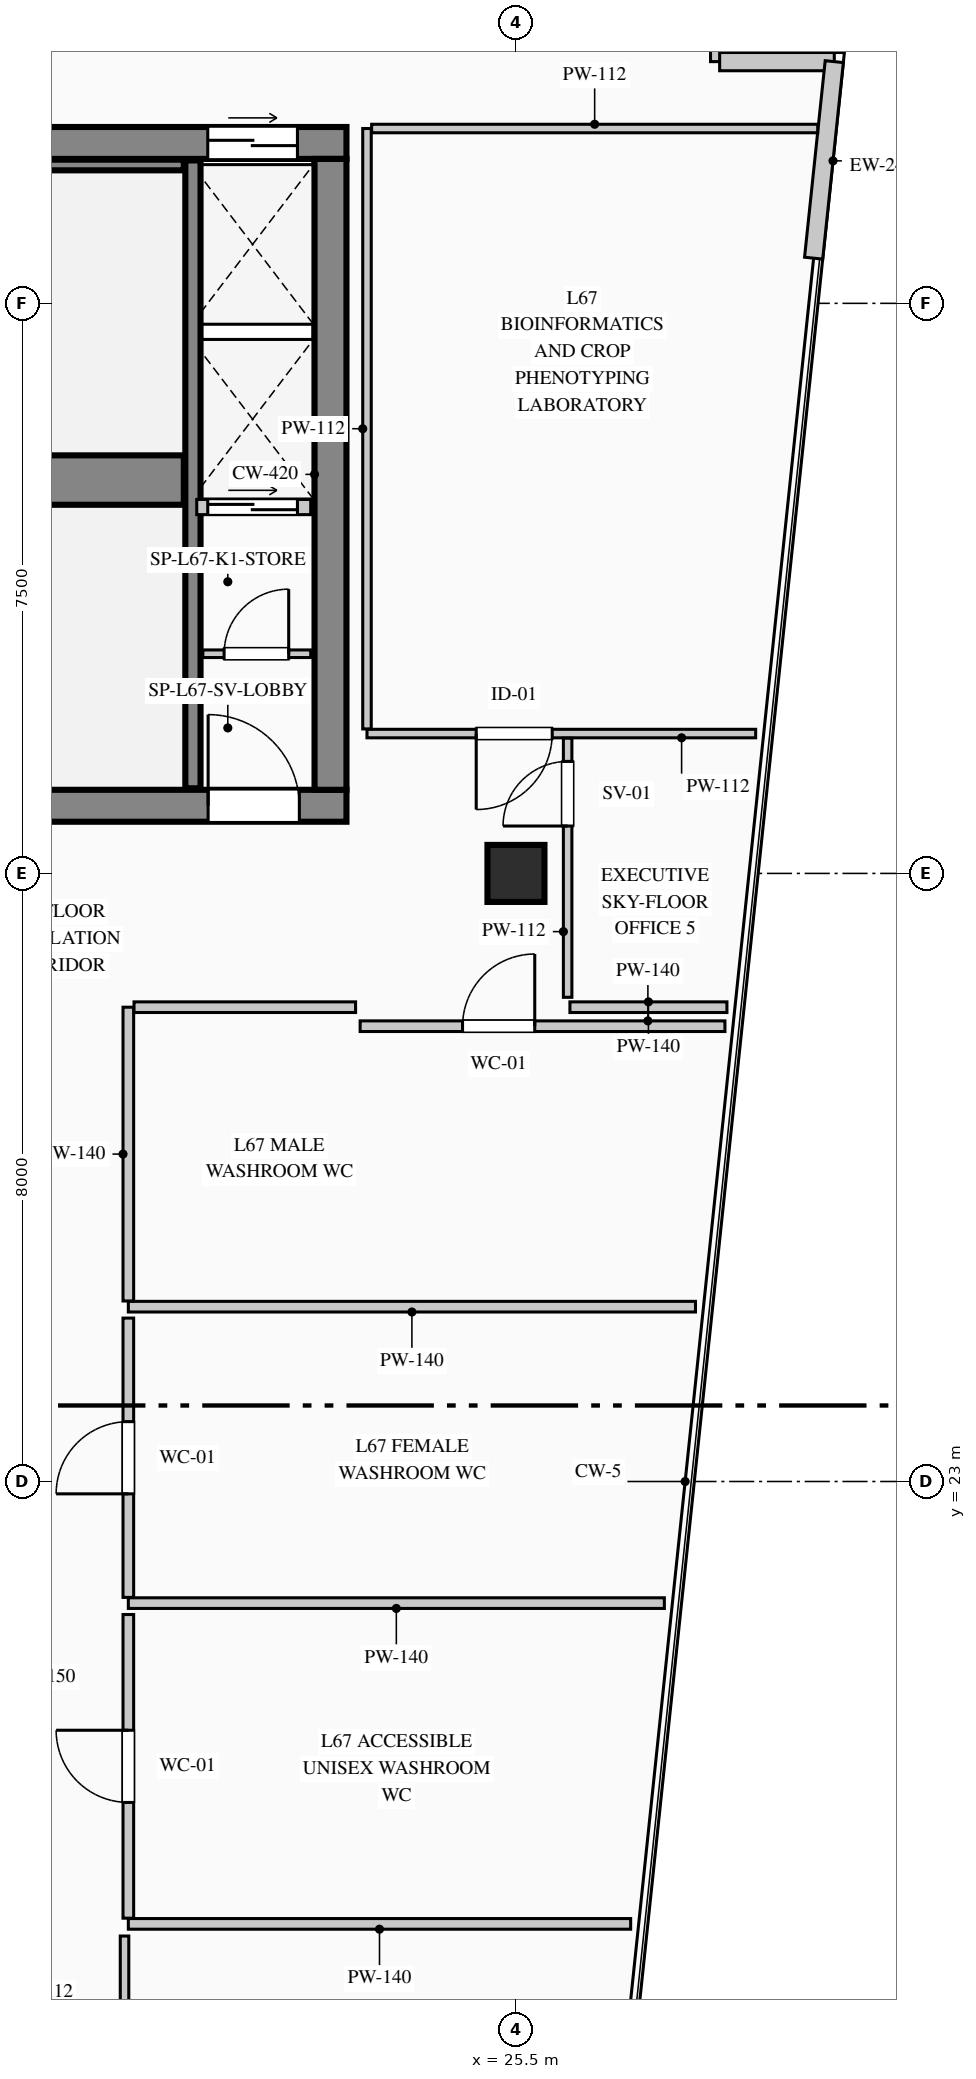
"""IFC4 building model, lengths in metres.
Left out: names, types, materials, properties, quantities, classifications, styles, units other than length and angle.
Written with IfcOpenShell. Run it as: python <this file> out.ifc"""

import sys

from ifc_helpers import new_model, si_unit, direction, frame, frame_2d, origin, origin_2d, place, context, subcontext, project, spatial, rectangle, extrude, element, fill, save


model = new_model("IFC4")
c1 = context("Model", 3, precision=1e-05, world=origin(), true_north=direction((0.0, 1.0)))
c2 = subcontext(c1, "Body", "Model", "MODEL_VIEW")
j1 = project(units=[si_unit("LENGTHUNIT", "METRE"), si_unit("PLANEANGLEUNIT", "RADIAN")], contexts=[c1])
p1 = place(None, origin())
s1 = spatial("IfcSite", under=j1, at=p1, CompositionType="ELEMENT")
p2 = place(p1, origin())
s2 = spatial("IfcBuilding", under=s1, at=p2, CompositionType="ELEMENT")
p3 = place(p2, frame((0.0, 0.0, 280.4)))
s3 = spatial("IfcBuildingStorey", under=s2, at=p3, CompositionType="ELEMENT", Elevation=280.4)
p4 = place(p3, frame((5.58, 40.61, 0.0), z_axis=(0.0, 0.0, 1.0), x_axis=(1.0, 0.0, 0.0)))
e1 = element("IfcWall", 1, at=p4, inside=s3, PredefinedType="SHEAR", context=c2, shape_type="SweptSolid", body=[
    extrude(rectangle(XDim=17.69, YDim=0.42, at=frame_2d((8.845, 0.0))), origin(), (0.0, 0.0, 1.0), 3.95),
])
p5 = place(p4, frame((15.865, 0.0, 0.0)))
e2 = element("IfcOpeningElement", 2, at=p5, cuts=e1, PredefinedType="OPENING", context=c2, shape_type="SweptSolid", body=[
    extrude(rectangle(XDim=1.18, YDim=2.25, at=frame_2d((0.59, 1.125))), frame((0.0, 0.22, 0.0), z_axis=(0.0, -1.0, 0.0), x_axis=(1.0, 0.0, 0.0)), (0.0, 0.0, 1.0), 0.44),
])
p6 = place(p3, frame((5.58, 31.89, 0.0), z_axis=(0.0, 0.0, 1.0), x_axis=(1.0, 0.0, 0.0)))
e3 = element("IfcWall", 3, at=p6, inside=s3, PredefinedType="SHEAR", context=c2, shape_type="SweptSolid", body=[
    extrude(rectangle(XDim=17.69, YDim=0.42, at=frame_2d((8.845, 0.0))), origin(), (0.0, 0.0, 1.0), 3.95),
])
p7 = place(p6, frame((3.07, 0.0, 0.0)))
e4 = element("IfcOpeningElement", 4, at=p7, cuts=e3, PredefinedType="OPENING", context=c2, shape_type="SweptSolid", body=[
    extrude(rectangle(XDim=1.2, YDim=2.2, at=frame_2d((0.6, 1.1))), frame((0.0, 0.22, 0.0), z_axis=(0.0, -1.0, 0.0), x_axis=(1.0, 0.0, 0.0)), (0.0, 0.0, 1.0), 0.44),
])
p8 = place(p6, frame((6.92, 0.0, 0.0)))
e5 = element("IfcOpeningElement", 5, at=p8, cuts=e3, PredefinedType="OPENING", context=c2, shape_type="SweptSolid", body=[
    extrude(rectangle(XDim=1.2, YDim=2.2, at=frame_2d((0.6, 1.1))), frame((0.0, 0.22, 0.0), z_axis=(0.0, -1.0, 0.0), x_axis=(1.0, 0.0, 0.0)), (0.0, 0.0, 1.0), 0.44),
])
p9 = place(p6, frame((8.77, 0.0, 0.0)))
e6 = element("IfcOpeningElement", 6, at=p9, cuts=e3, PredefinedType="OPENING", context=c2, shape_type="SweptSolid", body=[
    extrude(rectangle(XDim=1.15, YDim=2.2, at=frame_2d((0.575, 1.1))), frame((0.0, 0.22, 0.0), z_axis=(0.0, -1.0, 0.0), x_axis=(1.0, 0.0, 0.0)), (0.0, 0.0, 1.0), 0.44),
])
p10 = place(p6, frame((15.87, 0.0, 0.0)))
e7 = element("IfcOpeningElement", 7, at=p10, cuts=e3, PredefinedType="OPENING", context=c2, shape_type="SweptSolid", body=[
    extrude(rectangle(XDim=1.2, YDim=2.2, at=frame_2d((0.6, 1.1))), frame((0.0, 0.22, 0.0), z_axis=(0.0, -1.0, 0.0), x_axis=(1.0, 0.0, 0.0)), (0.0, 0.0, 1.0), 0.44),
])
p11 = place(p3, frame((23.06, 32.1, 0.0), z_axis=(0.0, 0.0, 1.0), x_axis=(0.0, 1.0, 0.0)))
e8 = element("IfcWall", 8, at=p11, inside=s3, PredefinedType="SHEAR", context=c2, shape_type="SweptSolid", body=[
    extrude(rectangle(XDim=8.3, YDim=0.42, at=frame_2d((4.15, 0.0))), origin(), (0.0, 0.0, 1.0), 3.95),
])
p12 = place(p3, frame((14.12, 36.175, 0.0), z_axis=(0.0, 0.0, 1.0), x_axis=(1.0, 0.0, 0.0)))
e9 = element("IfcWall", 9, at=p12, inside=s3, PredefinedType="SHEAR", context=c2, shape_type="SweptSolid", body=[
    extrude(rectangle(XDim=7.01, YDim=0.65, at=frame_2d((3.505, 0.0))), origin(), (0.0, 0.0, 1.0), 3.95),
])
p13 = place(p3, frame((21.25, 32.12, 0.0), z_axis=(0.0, 0.0, 1.0), x_axis=(0.0, 1.0, 0.0)))
e10 = element("IfcWall", 10, at=p13, inside=s3, PredefinedType="SHEAR", context=c2, shape_type="SweptSolid", body=[
    extrude(rectangle(XDim=8.26, YDim=0.2, at=frame_2d((4.13, 0.0))), origin(), (0.0, 0.0, 1.0), 3.95),
])
p14 = place(p3, frame((14.12, 40.32, 0.0), z_axis=(0.0, 0.0, 1.0), x_axis=(1.0, 0.0, 0.0)))
e11 = element("IfcWall", 11, at=p14, inside=s3, PredefinedType="SHEAR", context=c2, shape_type="SweptSolid", body=[
    extrude(rectangle(XDim=7.01, YDim=0.14, at=frame_2d((3.505, 0.0))), origin(), (0.0, 0.0, 1.0), 3.95),
])
p15 = place(p3, frame((25.5, 31.0, 0.0), z_axis=(0.0, 0.0, 1.0), x_axis=(1.0, 0.0, 0.0)))
e12 = element("IfcColumn", 12, at=p15, inside=s3, PredefinedType="COLUMN", context=c2, shape_type="SweptSolid", body=[
    extrude(rectangle(XDim=0.75, YDim=0.75, at=origin_2d()), origin(), (0.0, 0.0, 1.0), 3.95),
])
p16 = place(p3, frame((28.18, 43.38, 0.0), z_axis=(0.0, 0.0, 1.0), x_axis=(0.0, -1.0, 0.0)))
e13 = element("IfcWall", 13, at=p16, inside=s3, PredefinedType="STANDARD", context=c2, shape_type="SweptSolid", body=[
    extrude(rectangle(XDim=1.7, YDim=0.24, at=frame_2d((0.85, 0.0))), origin(), (0.0, 0.0, 1.0), 3.7),
])
p17 = place(p3, frame((28.18, 41.68, 0.0), z_axis=(0.0, 0.0, 1.0), x_axis=(1.0, 0.0, 0.0)))
e14 = element("IfcWall", 14, at=p17, inside=s3, PredefinedType="STANDARD", context=c2, shape_type="SweptSolid", body=[
    extrude(rectangle(XDim=1.508, YDim=0.24, at=frame_2d((0.754, 0.0))), origin(), (0.0, 0.0, 1.0), 3.7),
])
p18 = place(p3, frame((29.688, 41.68, 0.0), z_axis=(0.0, 0.0, 1.0), x_axis=(-0.104420821624, -0.994533203071, 0.0)))
e15 = element("IfcWall", 15, at=p18, inside=s3, PredefinedType="STANDARD", context=c2, shape_type="SweptSolid", body=[
    extrude(rectangle(XDim=2.6, YDim=0.24, at=frame_2d((1.3, 0.0))), origin(), (0.0, 0.0, 1.0), 3.7),
])
p19 = place(p3, frame((21.38, 33.89, 0.0), z_axis=(0.0, 0.0, 1.0), x_axis=(1.0, 0.0, 0.0)))
e16 = element("IfcWall", 16, at=p19, inside=s3, PredefinedType="PARTITIONING", context=c2, shape_type="SweptSolid", body=[
    extrude(rectangle(XDim=1.42, YDim=0.1, at=frame_2d((0.71, 0.0))), origin(), (0.0, 0.0, 1.0), 3.7),
])
p20 = place(p19, frame((0.28, 0.0, 0.0)))
e17 = element("IfcOpeningElement", 17, at=p20, cuts=e16, PredefinedType="OPENING", context=c2, shape_type="SweptSolid", body=[
    extrude(rectangle(XDim=0.85, YDim=2.1, at=frame_2d((0.425, 1.05))), frame((0.0, 0.06, 0.0), z_axis=(0.0, -1.0, 0.0), x_axis=(1.0, 0.0, 0.0)), (0.0, 0.0, 1.0), 0.12),
])
p21 = place(p3, frame((21.3, 35.82, 0.0), z_axis=(0.0, 0.0, 1.0), x_axis=(1.0, 0.0, 0.0)))
e18 = element("IfcWall", 18, at=p21, inside=s3, PredefinedType="PARTITIONING", context=c2, shape_type="SweptSolid", body=[
    extrude(rectangle(XDim=1.5, YDim=0.2, at=frame_2d((0.75, 0.0))), origin(), (0.0, 0.0, 1.0), 3.7),
])
p22 = place(p21, frame((0.145, 0.0, 0.0)))
e19 = element("IfcOpeningElement", 19, at=p22, cuts=e18, PredefinedType="OPENING", context=c2, shape_type="SweptSolid", body=[
    extrude(rectangle(XDim=1.18, YDim=2.25, at=frame_2d((0.59, 1.125))), frame((0.0, 0.11, 0.0), z_axis=(0.0, -1.0, 0.0), x_axis=(1.0, 0.0, 0.0)), (0.0, 0.0, 1.0), 0.22),
])
p23 = place(p3, frame((28.654, 32.84, 0.0), z_axis=(0.0, 0.0, 1.0), x_axis=(-1.0, 0.0, 0.0)))
e20 = element("IfcWall", 20, at=p23, inside=s3, PredefinedType="PARTITIONING", context=c2, shape_type="SweptSolid", body=[
    extrude(rectangle(XDim=5.114, YDim=0.112, at=frame_2d((2.557, 0.0))), origin(), (0.0, 0.0, 1.0), 3.7),
])
p24 = place(p23, frame((2.677, 0.0, 0.0)))
e21 = element("IfcOpeningElement", 21, at=p24, cuts=e20, PredefinedType="OPENING", context=c2, shape_type="SweptSolid", body=[
    extrude(rectangle(XDim=1.0, YDim=2.15, at=frame_2d((0.5, 1.075))), frame((0.0, 0.066, 0.0), z_axis=(0.0, -1.0, 0.0), x_axis=(1.0, 0.0, 0.0)), (0.0, 0.0, 1.0), 0.132),
])
p25 = place(p3, frame((23.54, 32.901, 0.0), z_axis=(0.0, 0.0, 1.0), x_axis=(0.0, 1.0, 0.0)))
e22 = element("IfcWall", 22, at=p25, inside=s3, PredefinedType="PARTITIONING", context=c2, shape_type="SweptSolid", body=[
    extrude(rectangle(XDim=7.899, YDim=0.112, at=frame_2d((3.95, 0.0))), origin(), (0.0, 0.0, 1.0), 3.7),
])
p26 = place(p3, frame((23.601, 40.8, 0.0), z_axis=(0.0, 0.0, 1.0), x_axis=(1.0, 0.0, 0.0)))
e23 = element("IfcWall", 23, at=p26, inside=s3, PredefinedType="PARTITIONING", context=c2, shape_type="SweptSolid", body=[
    extrude(rectangle(XDim=5.869, YDim=0.112, at=frame_2d((2.935, 0.0))), origin(), (0.0, 0.0, 1.0), 3.7),
])
p27 = place(p3, frame((23.45, 28.99, 0.0), z_axis=(0.0, 0.0, 1.0), x_axis=(1.0, 0.0, 0.0)))
e24 = element("IfcWall", 24, at=p27, inside=s3, PredefinedType="PARTITIONING", context=c2, shape_type="SweptSolid", body=[
    extrude(rectangle(XDim=4.8, YDim=0.14, at=frame_2d((2.4, 0.0))), origin(), (0.0, 0.0, 1.0), 3.7),
])
p28 = place(p27, frame((1.347, 0.0, 0.0)))
e25 = element("IfcOpeningElement", 25, at=p28, cuts=e24, PredefinedType="OPENING", context=c2, shape_type="SweptSolid", body=[
    extrude(rectangle(XDim=0.95, YDim=2.15, at=frame_2d((0.475, 1.075))), frame((0.0, 0.08, 0.0), z_axis=(0.0, -1.0, 0.0), x_axis=(1.0, 0.0, 0.0)), (0.0, 0.0, 1.0), 0.16),
])
p29 = place(p3, frame((26.21, 29.24, 0.0), z_axis=(0.0, 0.0, 1.0), x_axis=(1.0, 0.0, 0.0)))
e26 = element("IfcWall", 26, at=p29, inside=s3, PredefinedType="PARTITIONING", context=c2, shape_type="SweptSolid", body=[
    extrude(rectangle(XDim=2.066, YDim=0.14, at=frame_2d((1.033, 0.0))), origin(), (0.0, 0.0, 1.0), 3.7),
])
p30 = place(p3, frame((27.862, 25.3, 0.0), z_axis=(0.0, 0.0, 1.0), x_axis=(-1.0, 0.0, 0.0)))
e27 = element("IfcWall", 27, at=p30, inside=s3, PredefinedType="PARTITIONING", context=c2, shape_type="SweptSolid", body=[
    extrude(rectangle(XDim=7.462, YDim=0.14, at=frame_2d((3.731, 0.0))), origin(), (0.0, 0.0, 1.0), 3.7),
])
p31 = place(p3, frame((20.4, 25.375, 0.0), z_axis=(0.0, 0.0, 1.0), x_axis=(0.0, 1.0, 0.0)))
e28 = element("IfcWall", 28, at=p31, inside=s3, PredefinedType="PARTITIONING", context=c2, shape_type="SweptSolid", body=[
    extrude(rectangle(XDim=3.865, YDim=0.14, at=frame_2d((1.933, 0.0))), origin(), (0.0, 0.0, 1.0), 3.7),
])
p32 = place(p3, frame((20.475, 29.24, 0.0), z_axis=(0.0, 0.0, 1.0), x_axis=(1.0, 0.0, 0.0)))
e29 = element("IfcWall", 29, at=p32, inside=s3, PredefinedType="PARTITIONING", context=c2, shape_type="SweptSolid", body=[
    extrude(rectangle(XDim=2.915, YDim=0.14, at=frame_2d((1.458, 0.0))), origin(), (0.0, 0.0, 1.0), 3.7),
])
p33 = place(p3, frame((27.452, 21.4, 0.0), z_axis=(0.0, 0.0, 1.0), x_axis=(-1.0, 0.0, 0.0)))
e30 = element("IfcWall", 30, at=p33, inside=s3, PredefinedType="PARTITIONING", context=c2, shape_type="SweptSolid", body=[
    extrude(rectangle(XDim=7.052, YDim=0.14, at=frame_2d((3.526, 0.0))), origin(), (0.0, 0.0, 1.0), 3.7),
])
p34 = place(p3, frame((20.4, 21.475, 0.0), z_axis=(0.0, 0.0, 1.0), x_axis=(0.0, 1.0, 0.0)))
e31 = element("IfcWall", 31, at=p34, inside=s3, PredefinedType="PARTITIONING", context=c2, shape_type="SweptSolid", body=[
    extrude(rectangle(XDim=3.675, YDim=0.14, at=frame_2d((1.837, 0.0))), origin(), (0.0, 0.0, 1.0), 3.7),
])
p35 = place(p34, frame((1.363, 0.0, 0.0)))
e32 = element("IfcOpeningElement", 32, at=p35, cuts=e31, PredefinedType="OPENING", context=c2, shape_type="SweptSolid", body=[
    extrude(rectangle(XDim=0.95, YDim=2.15, at=frame_2d((0.475, 1.075))), frame((0.0, 0.08, 0.0), z_axis=(0.0, -1.0, 0.0), x_axis=(1.0, 0.0, 0.0)), (0.0, 0.0, 1.0), 0.16),
])
p36 = place(p3, frame((27.009, 17.18, 0.0), z_axis=(0.0, 0.0, 1.0), x_axis=(-1.0, 0.0, 0.0)))
e33 = element("IfcWall", 33, at=p36, inside=s3, PredefinedType="PARTITIONING", context=c2, shape_type="SweptSolid", body=[
    extrude(rectangle(XDim=6.609, YDim=0.14, at=frame_2d((3.305, 0.0))), origin(), (0.0, 0.0, 1.0), 3.7),
])
p37 = place(p3, frame((20.4, 17.255, 0.0), z_axis=(0.0, 0.0, 1.0), x_axis=(0.0, 1.0, 0.0)))
e34 = element("IfcWall", 34, at=p37, inside=s3, PredefinedType="PARTITIONING", context=c2, shape_type="SweptSolid", body=[
    extrude(rectangle(XDim=3.995, YDim=0.14, at=frame_2d((1.998, 0.0))), origin(), (0.0, 0.0, 1.0), 3.7),
])
p38 = place(p37, frame((1.522, 0.0, 0.0)))
e35 = element("IfcOpeningElement", 35, at=p38, cuts=e34, PredefinedType="OPENING", context=c2, shape_type="SweptSolid", body=[
    extrude(rectangle(XDim=0.95, YDim=2.15, at=frame_2d((0.475, 1.075))), frame((0.0, 0.08, 0.0), z_axis=(0.0, -1.0, 0.0), x_axis=(1.0, 0.0, 0.0)), (0.0, 0.0, 1.0), 0.16),
])
p39 = place(p3, frame((20.35, 13.44, 0.0), z_axis=(0.0, 0.0, 1.0), x_axis=(0.0, 1.0, 0.0)))
e36 = element("IfcWall", 36, at=p39, inside=s3, PredefinedType="PARTITIONING", context=c2, shape_type="SweptSolid", body=[
    extrude(rectangle(XDim=3.58, YDim=0.112, at=frame_2d((1.79, 0.0))), origin(), (0.0, 0.0, 1.0), 3.7),
])
p40 = place(p39, frame((1.29, 0.0, 0.0)))
e37 = element("IfcOpeningElement", 37, at=p40, cuts=e36, PredefinedType="OPENING", context=c2, shape_type="SweptSolid", body=[
    extrude(rectangle(XDim=1.0, YDim=2.15, at=frame_2d((0.5, 1.075))), frame((0.0, 0.066, 0.0), z_axis=(0.0, -1.0, 0.0), x_axis=(1.0, 0.0, 0.0)), (0.0, 0.0, 1.0), 0.132),
])
p41 = place(p3, frame((26.18, 29.37, 0.0), z_axis=(0.0, 0.0, 1.0), x_axis=(0.0, 1.0, 0.0)))
e38 = element("IfcWall", 38, at=p41, inside=s3, PredefinedType="PARTITIONING", context=c2, shape_type="SweptSolid", body=[
    extrude(rectangle(XDim=3.409, YDim=0.112, at=frame_2d((1.705, 0.0))), origin(), (0.0, 0.0, 1.0), 3.7),
])
p42 = place(p41, frame((2.253, 0.0, 0.0)))
e39 = element("IfcOpeningElement", 39, at=p42, cuts=e38, PredefinedType="OPENING", context=c2, shape_type="SweptSolid", body=[
    extrude(rectangle(XDim=0.85, YDim=2.1, at=frame_2d((0.425, 1.05))), frame((0.0, 0.066, 0.0), z_axis=(0.0, -1.0, 0.0), x_axis=(1.0, 0.0, 0.0)), (0.0, 0.0, 1.0), 0.132),
])
p43 = place(p10, origin())
e40 = element("IfcDoor", 40, at=p43, inside=s3, OperationType="SINGLE_SWING_LEFT", PredefinedType="DOOR", context=c2, shape_type="SweptSolid", body=[
    extrude(rectangle(XDim=1.2, YDim=2.2, at=frame_2d((0.6, 1.1))), frame((0.0, 0.025, 0.0), z_axis=(0.0, -1.0, 0.0), x_axis=(1.0, 0.0, 0.0)), (0.0, 0.0, 1.0), 0.05),
])
fill(e7, e40)
p44 = place(p20, origin())
e41 = element("IfcDoor", 41, at=p44, inside=s3, OperationType="SINGLE_SWING_RIGHT", PredefinedType="DOOR", context=c2, shape_type="SweptSolid", body=[
    extrude(rectangle(XDim=0.85, YDim=2.1, at=frame_2d((0.425, 1.05))), frame((0.0, 0.025, 0.0), z_axis=(0.0, -1.0, 0.0), x_axis=(1.0, 0.0, 0.0)), (0.0, 0.0, 1.0), 0.05),
])
fill(e17, e41)
p45 = place(p5, origin())
e42 = element("IfcDoor", 42, at=p45, inside=s3, OperationType="DOUBLE_DOOR_SLIDING", PredefinedType="DOOR", context=c2, shape_type="SweptSolid", body=[
    extrude(rectangle(XDim=1.18, YDim=2.25, at=frame_2d((0.59, 1.125))), frame((0.0, 0.025, 0.0), z_axis=(0.0, -1.0, 0.0), x_axis=(1.0, 0.0, 0.0)), (0.0, 0.0, 1.0), 0.05),
])
fill(e2, e42)
p46 = place(p22, origin())
e43 = element("IfcDoor", 43, at=p46, inside=s3, OperationType="DOUBLE_DOOR_SLIDING", PredefinedType="DOOR", context=c2, shape_type="SweptSolid", body=[
    extrude(rectangle(XDim=1.18, YDim=2.25, at=frame_2d((0.59, 1.125))), frame((0.0, 0.025, 0.0), z_axis=(0.0, -1.0, 0.0), x_axis=(1.0, 0.0, 0.0)), (0.0, 0.0, 1.0), 0.05),
])
fill(e19, e43)
p47 = place(p24, origin())
e44 = element("IfcDoor", 44, at=p47, inside=s3, OperationType="SINGLE_SWING_RIGHT", PredefinedType="DOOR", context=c2, shape_type="SweptSolid", body=[
    extrude(rectangle(XDim=1.0, YDim=2.15, at=frame_2d((0.5, 1.075))), frame((0.0, 0.025, 0.0), z_axis=(0.0, -1.0, 0.0), x_axis=(1.0, 0.0, 0.0)), (0.0, 0.0, 1.0), 0.05),
])
fill(e21, e44)
p48 = place(p28, origin())
e45 = element("IfcDoor", 45, at=p48, inside=s3, OperationType="SINGLE_SWING_RIGHT", PredefinedType="DOOR", context=c2, shape_type="SweptSolid", body=[
    extrude(rectangle(XDim=0.95, YDim=2.15, at=frame_2d((0.475, 1.075))), frame((0.0, 0.025, 0.0), z_axis=(0.0, -1.0, 0.0), x_axis=(1.0, 0.0, 0.0)), (0.0, 0.0, 1.0), 0.05),
])
fill(e25, e45)
p49 = place(p35, origin())
e46 = element("IfcDoor", 46, at=p49, inside=s3, OperationType="SINGLE_SWING_LEFT", PredefinedType="DOOR", context=c2, shape_type="SweptSolid", body=[
    extrude(rectangle(XDim=0.95, YDim=2.15, at=frame_2d((0.475, 1.075))), frame((0.0, 0.025, 0.0), z_axis=(0.0, -1.0, 0.0), x_axis=(1.0, 0.0, 0.0)), (0.0, 0.0, 1.0), 0.05),
])
fill(e32, e46)
p50 = place(p38, origin())
e47 = element("IfcDoor", 47, at=p50, inside=s3, OperationType="SINGLE_SWING_RIGHT", PredefinedType="DOOR", context=c2, shape_type="SweptSolid", body=[
    extrude(rectangle(XDim=0.95, YDim=2.15, at=frame_2d((0.475, 1.075))), frame((0.0, 0.025, 0.0), z_axis=(0.0, -1.0, 0.0), x_axis=(1.0, 0.0, 0.0)), (0.0, 0.0, 1.0), 0.05),
])
fill(e35, e47)
p51 = place(p42, origin())
e48 = element("IfcDoor", 48, at=p51, inside=s3, OperationType="SINGLE_SWING_LEFT", PredefinedType="DOOR", context=c2, shape_type="SweptSolid", body=[
    extrude(rectangle(XDim=0.85, YDim=2.1, at=frame_2d((0.425, 1.05))), frame((0.0, 0.025, 0.0), z_axis=(0.0, -1.0, 0.0), x_axis=(1.0, 0.0, 0.0)), (0.0, 0.0, 1.0), 0.05),
])
fill(e39, e48)
save(model, sys.argv[1])
